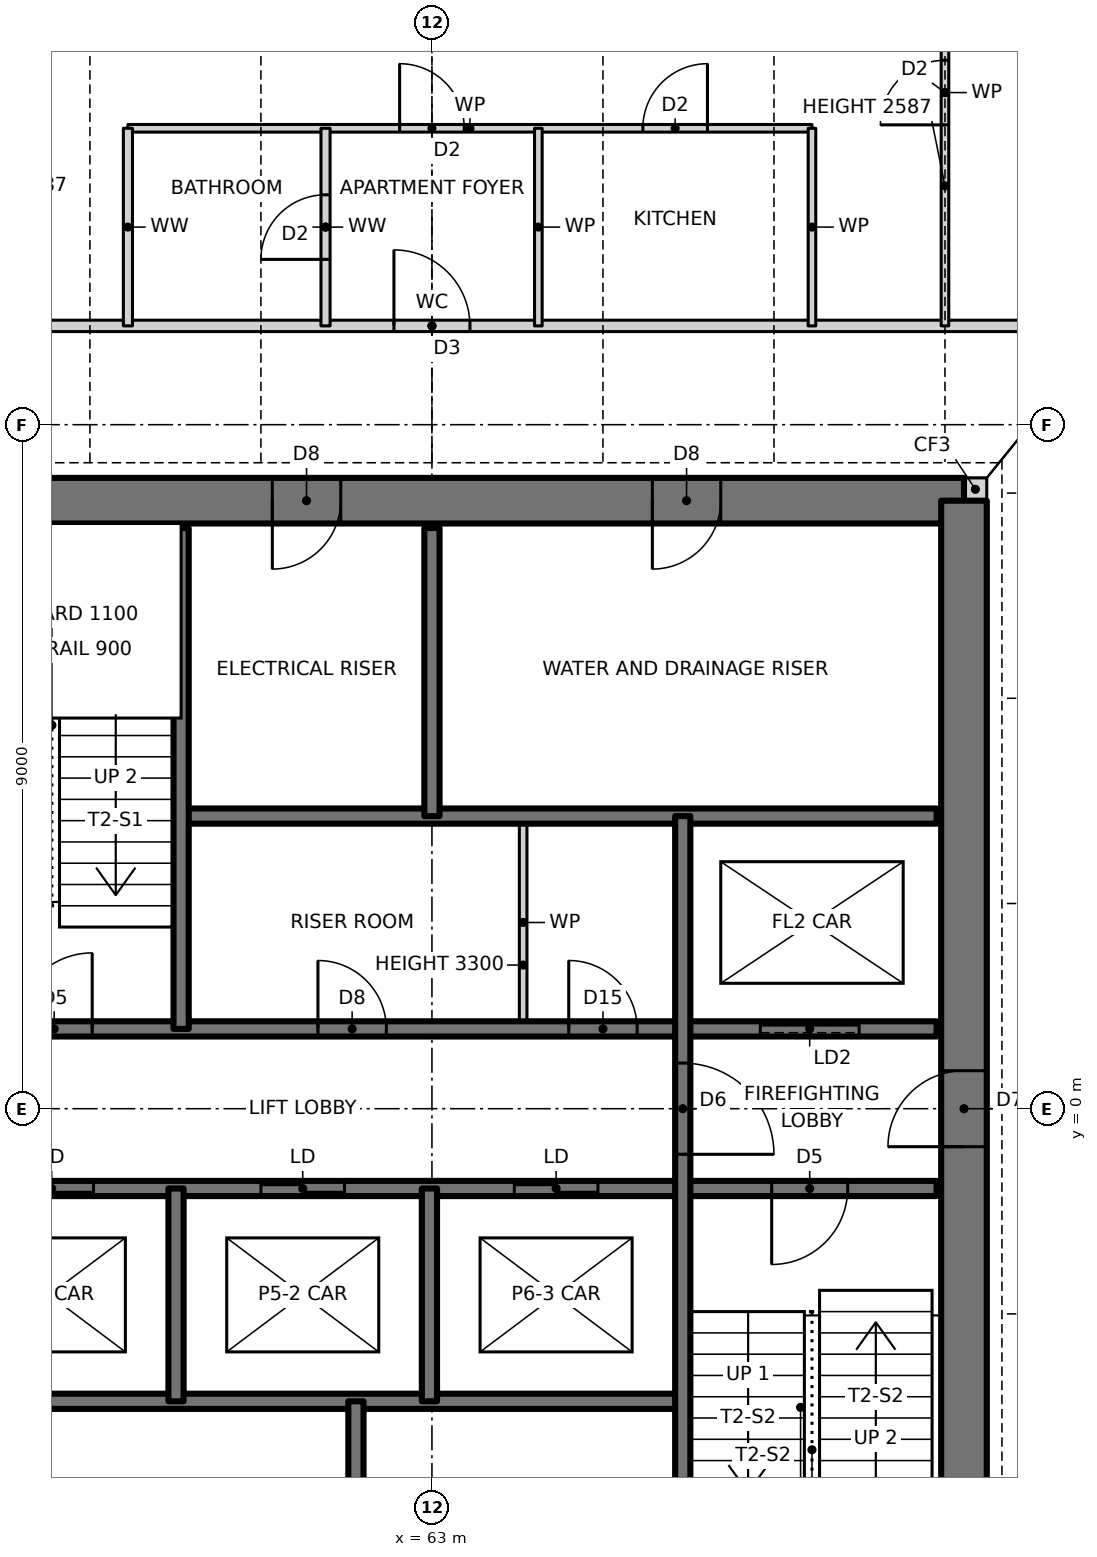
"""IFC4 building model, lengths in metres.
Left out: names, types, materials, properties, quantities, classifications, styles, units other than length and angle.
Written with IfcOpenShell. Run it as: python <this file> out.ifc"""

import sys

from ifc_helpers import new_model, si_unit, direction, frame, frame_2d, origin, place, context, subcontext, project, spatial, rectangle, extrude, element, fill, save


model = new_model("IFC4")
c1 = context("Model", 3, precision=1e-05, world=origin(), true_north=direction((0.0, 1.0)))
c2 = subcontext(c1, "Body", "Model", "MODEL_VIEW")
j1 = project(units=[si_unit("LENGTHUNIT", "METRE"), si_unit("PLANEANGLEUNIT", "RADIAN")], contexts=[c1])
p1 = place(None, origin())
s1 = spatial("IfcSite", under=j1, at=p1, CompositionType="ELEMENT")
p2 = place(p1, origin())
s2 = spatial("IfcBuilding", under=s1, at=p2, CompositionType="ELEMENT")
p3 = place(p2, frame((0.0, 0.0, 122.5)))
s3 = spatial("IfcBuildingStorey", under=s2, at=p3, CompositionType="ELEMENT", Elevation=122.5)
p4 = place(p3, frame((70.0, 8.15, 0.0), z_axis=(0.0, 0.0, 1.0), x_axis=(1.0, 0.0, 0.0)))
e1 = element("IfcWall", 1, at=p4, inside=s3, PredefinedType="SOLIDWALL", context=c2, shape_type="SweptSolid", body=[
    extrude(rectangle(XDim=0.3, YDim=0.3, at=frame_2d((0.15, 0.0))), origin(), (0.0, 0.0, 1.0), 3.5),
])
p5 = place(p3, frame((70.0, 8.0, 0.0), z_axis=(0.0, 0.0, 1.0), x_axis=(-1.0, 0.0, 0.0)))
e2 = element("IfcWall", 2, at=p5, inside=s3, PredefinedType="SHEAR", context=c2, shape_type="SweptSolid", body=[
    extrude(rectangle(XDim=14.0, YDim=0.6, at=frame_2d((7.0, 0.0))), origin(), (0.0, 0.0, 1.0), 3.5),
])
p6 = place(p5, frame((8.2, 0.0, 0.0)))
e3 = element("IfcOpeningElement", 3, at=p6, cuts=e2, PredefinedType="OPENING", context=c2, shape_type="SweptSolid", body=[
    extrude(rectangle(XDim=0.9, YDim=2.1, at=frame_2d((0.45, 1.05))), frame((0.0, 0.31, 0.0), z_axis=(0.0, -1.0, 0.0), x_axis=(1.0, 0.0, 0.0)), (0.0, 0.0, 1.0), 0.62),
])
p7 = place(p5, frame((3.2, 0.0, 0.0)))
e4 = element("IfcOpeningElement", 4, at=p7, cuts=e2, PredefinedType="OPENING", context=c2, shape_type="SweptSolid", body=[
    extrude(rectangle(XDim=0.9, YDim=2.1, at=frame_2d((0.45, 1.05))), frame((0.0, 0.31, 0.0), z_axis=(0.0, -1.0, 0.0), x_axis=(1.0, 0.0, 0.0)), (0.0, 0.0, 1.0), 0.62),
])
p8 = place(p3, frame((70.0, -8.0, 0.0), z_axis=(0.0, 0.0, 1.0), x_axis=(0.0, 1.0, 0.0)))
e5 = element("IfcWall", 5, at=p8, inside=s3, PredefinedType="SHEAR", context=c2, shape_type="SweptSolid", body=[
    extrude(rectangle(XDim=16.0, YDim=0.6, at=frame_2d((8.0, 0.0))), origin(), (0.0, 0.0, 1.0), 3.5),
])
p9 = place(p8, frame((7.5, 0.0, 0.0)))
e6 = element("IfcOpeningElement", 6, at=p9, cuts=e5, PredefinedType="OPENING", context=c2, shape_type="SweptSolid", body=[
    extrude(rectangle(XDim=1.0, YDim=2.1, at=frame_2d((0.5, 1.05))), frame((0.0, 0.31, 0.0), z_axis=(0.0, -1.0, 0.0), x_axis=(1.0, 0.0, 0.0)), (0.0, 0.0, 1.0), 0.62),
])
p10 = place(p3, frame((56.36, -3.85, 0.0), z_axis=(0.0, 0.0, 1.0), x_axis=(1.0, 0.0, 0.0)))
e7 = element("IfcWall", 7, at=p10, inside=s3, PredefinedType="SOLIDWALL", context=c2, shape_type="SweptSolid", body=[
    extrude(rectangle(XDim=9.94, YDim=0.2, at=frame_2d((4.97, 0.0))), origin(), (0.0, 0.0, 1.0), 3.5),
])
p11 = place(p3, frame((56.36, -1.05, 0.0), z_axis=(0.0, 0.0, 1.0), x_axis=(1.0, 0.0, 0.0)))
e8 = element("IfcWall", 8, at=p11, inside=s3, PredefinedType="SOLIDWALL", context=c2, shape_type="SweptSolid", body=[
    extrude(rectangle(XDim=13.28, YDim=0.2, at=frame_2d((6.64, 0.0))), origin(), (0.0, 0.0, 1.0), 3.5),
])
p12 = place(p11, frame((11.11, 0.0, 0.0)))
e9 = element("IfcOpeningElement", 9, at=p12, cuts=e8, PredefinedType="OPENING", context=c2, shape_type="SweptSolid", body=[
    extrude(rectangle(XDim=1.0, YDim=2.1, at=frame_2d((0.5, 1.05))), frame((0.0, 0.11, 0.0), z_axis=(0.0, -1.0, 0.0), x_axis=(1.0, 0.0, 0.0)), (0.0, 0.0, 1.0), 0.22),
])
p13 = place(p11, frame((1.087, 0.0, 0.0)))
e10 = element("IfcOpeningElement", 10, at=p13, cuts=e8, PredefinedType="OPENING", context=c2, shape_type="SweptSolid", body=[
    extrude(rectangle(XDim=1.1, YDim=2.1, at=frame_2d((0.55, 1.05))), frame((0.0, 0.11, 0.0), z_axis=(0.0, -1.0, 0.0), x_axis=(1.0, 0.0, 0.0)), (0.0, 0.0, 1.0), 0.22),
])
p14 = place(p11, frame((4.39, 0.0, 0.0)))
e11 = element("IfcOpeningElement", 11, at=p14, cuts=e8, PredefinedType="OPENING", context=c2, shape_type="SweptSolid", body=[
    extrude(rectangle(XDim=1.1, YDim=2.1, at=frame_2d((0.55, 1.05))), frame((0.0, 0.11, 0.0), z_axis=(0.0, -1.0, 0.0), x_axis=(1.0, 0.0, 0.0)), (0.0, 0.0, 1.0), 0.22),
])
p15 = place(p11, frame((7.724, 0.0, 0.0)))
e12 = element("IfcOpeningElement", 12, at=p15, cuts=e8, PredefinedType="OPENING", context=c2, shape_type="SweptSolid", body=[
    extrude(rectangle(XDim=1.1, YDim=2.1, at=frame_2d((0.55, 1.05))), frame((0.0, 0.11, 0.0), z_axis=(0.0, -1.0, 0.0), x_axis=(1.0, 0.0, 0.0)), (0.0, 0.0, 1.0), 0.22),
])
p16 = place(p3, frame((56.36, 1.05, 0.0), z_axis=(0.0, 0.0, 1.0), x_axis=(1.0, 0.0, 0.0)))
e13 = element("IfcWall", 13, at=p16, inside=s3, PredefinedType="SOLIDWALL", context=c2, shape_type="SweptSolid", body=[
    extrude(rectangle(XDim=13.28, YDim=0.2, at=frame_2d((6.64, 0.0))), origin(), (0.0, 0.0, 1.0), 3.5),
])
p17 = place(p16, frame((1.17, 0.0, 0.0)))
e14 = element("IfcOpeningElement", 14, at=p17, cuts=e13, PredefinedType="OPENING", context=c2, shape_type="SweptSolid", body=[
    extrude(rectangle(XDim=1.0, YDim=2.1, at=frame_2d((0.5, 1.05))), frame((0.0, 0.11, 0.0), z_axis=(0.0, -1.0, 0.0), x_axis=(1.0, 0.0, 0.0)), (0.0, 0.0, 1.0), 0.22),
])
p18 = place(p16, frame((5.14, 0.0, 0.0)))
e15 = element("IfcOpeningElement", 15, at=p18, cuts=e13, PredefinedType="OPENING", context=c2, shape_type="SweptSolid", body=[
    extrude(rectangle(XDim=0.9, YDim=2.1, at=frame_2d((0.45, 1.05))), frame((0.0, 0.11, 0.0), z_axis=(0.0, -1.0, 0.0), x_axis=(1.0, 0.0, 0.0)), (0.0, 0.0, 1.0), 0.22),
])
p19 = place(p16, frame((8.44, 0.0, 0.0)))
e16 = element("IfcOpeningElement", 16, at=p19, cuts=e13, PredefinedType="OPENING", context=c2, shape_type="SweptSolid", body=[
    extrude(rectangle(XDim=0.9, YDim=2.1, at=frame_2d((0.45, 1.05))), frame((0.0, 0.11, 0.0), z_axis=(0.0, -1.0, 0.0), x_axis=(1.0, 0.0, 0.0)), (0.0, 0.0, 1.0), 0.22),
])
p20 = place(p16, frame((10.96, 0.0, 0.0)))
e17 = element("IfcOpeningElement", 17, at=p20, cuts=e13, PredefinedType="OPENING", context=c2, shape_type="SweptSolid", body=[
    extrude(rectangle(XDim=1.3, YDim=2.1, at=frame_2d((0.65, 1.05))), frame((0.0, 0.11, 0.0), z_axis=(0.0, -1.0, 0.0), x_axis=(1.0, 0.0, 0.0)), (0.0, 0.0, 1.0), 0.22),
])
p21 = place(p3, frame((59.7, 3.85, 0.0), z_axis=(0.0, 0.0, 1.0), x_axis=(1.0, 0.0, 0.0)))
e18 = element("IfcWall", 18, at=p21, inside=s3, PredefinedType="SOLIDWALL", context=c2, shape_type="SweptSolid", body=[
    extrude(rectangle(XDim=9.94, YDim=0.2, at=frame_2d((4.97, 0.0))), origin(), (0.0, 0.0, 1.0), 3.5),
])
p22 = place(p3, frame((53.7, 10.3, 0.0), z_axis=(0.0, 0.0, 1.0), x_axis=(1.0, 0.0, 0.0)))
e19 = element("IfcWall", 19, at=p22, inside=s3, PredefinedType="PARTITIONING", context=c2, shape_type="SweptSolid", body=[
    extrude(rectangle(XDim=18.6, YDim=0.15, at=frame_2d((9.3, 0.0))), origin(), (0.0, 0.0, 1.0), 3.27),
])
p23 = place(p22, frame((8.8, 0.0, 0.0)))
e20 = element("IfcOpeningElement", 20, at=p23, cuts=e19, PredefinedType="OPENING", context=c2, shape_type="SweptSolid", body=[
    extrude(rectangle(XDim=1.0, YDim=2.1, at=frame_2d((0.5, 1.05))), frame((0.0, 0.085, 0.0), z_axis=(0.0, -1.0, 0.0), x_axis=(1.0, 0.0, 0.0)), (0.0, 0.0, 1.0), 0.17),
])
p24 = place(p3, frame((59.0, 12.9, 0.0), z_axis=(0.0, 0.0, 1.0), x_axis=(1.0, 0.0, 0.0)))
e21 = element("IfcWall", 21, at=p24, inside=s3, PredefinedType="PARTITIONING", context=c2, shape_type="SweptSolid", body=[
    extrude(rectangle(XDim=9.0, YDim=0.1, at=frame_2d((4.5, 0.0))), origin(), (0.0, 0.0, 1.0), 3.27),
])
p25 = place(p24, frame((6.775, 0.0, 0.0)))
e22 = element("IfcOpeningElement", 22, at=p25, cuts=e21, PredefinedType="OPENING", context=c2, shape_type="SweptSolid", body=[
    extrude(rectangle(XDim=0.85, YDim=2.1, at=frame_2d((0.425, 1.05))), frame((0.0, 0.06, 0.0), z_axis=(0.0, -1.0, 0.0), x_axis=(1.0, 0.0, 0.0)), (0.0, 0.0, 1.0), 0.12),
])
p26 = place(p24, frame((3.575, 0.0, 0.0)))
e23 = element("IfcOpeningElement", 23, at=p26, cuts=e21, PredefinedType="OPENING", context=c2, shape_type="SweptSolid", body=[
    extrude(rectangle(XDim=0.85, YDim=2.1, at=frame_2d((0.425, 1.05))), frame((0.0, 0.06, 0.0), z_axis=(0.0, -1.0, 0.0), x_axis=(1.0, 0.0, 0.0)), (0.0, 0.0, 1.0), 0.12),
])
p27 = place(p3, frame((69.75, 10.3, 0.0), z_axis=(0.0, 0.0, 1.0), x_axis=(0.0, 1.0, 0.0)))
e24 = element("IfcWall", 24, at=p27, inside=s3, PredefinedType="PARTITIONING", context=c2, shape_type="SweptSolid", body=[
    extrude(rectangle(XDim=6.14, YDim=0.1, at=frame_2d((3.07, 0.0))), origin(), (0.0, 0.0, 1.0), 2.587),
])
p28 = place(p27, frame((2.645, 0.0, 0.0)))
e25 = element("IfcOpeningElement", 25, at=p28, cuts=e24, PredefinedType="OPENING", context=c2, shape_type="SweptSolid", body=[
    extrude(rectangle(XDim=0.85, YDim=2.1, at=frame_2d((0.425, 1.05))), frame((0.0, 0.06, 0.0), z_axis=(0.0, -1.0, 0.0), x_axis=(1.0, 0.0, 0.0)), (0.0, 0.0, 1.0), 0.12),
])
p29 = place(p3, frame((68.0, 10.3, 0.0), z_axis=(0.0, 0.0, 1.0), x_axis=(0.0, 1.0, 0.0)))
e26 = element("IfcWall", 26, at=p29, inside=s3, PredefinedType="PARTITIONING", context=c2, shape_type="SweptSolid", body=[
    extrude(rectangle(XDim=2.6, YDim=0.1, at=frame_2d((1.3, 0.0))), origin(), (0.0, 0.0, 1.0), 3.27),
])
p30 = place(p3, frame((66.3, -7.64, 0.0), z_axis=(0.0, 0.0, 1.0), x_axis=(0.0, 1.0, 0.0)))
e27 = element("IfcWall", 27, at=p30, inside=s3, PredefinedType="SOLIDWALL", context=c2, shape_type="SweptSolid", body=[
    extrude(rectangle(XDim=11.49, YDim=0.2, at=frame_2d((5.745, 0.0))), origin(), (0.0, 0.0, 1.0), 3.5),
])
p31 = place(p30, frame((7.04, 0.0, 0.0)))
e28 = element("IfcOpeningElement", 28, at=p31, cuts=e27, PredefinedType="OPENING", context=c2, shape_type="SweptSolid", body=[
    extrude(rectangle(XDim=1.2, YDim=2.1, at=frame_2d((0.6, 1.05))), frame((0.0, 0.11, 0.0), z_axis=(0.0, -1.0, 0.0), x_axis=(1.0, 0.0, 0.0)), (0.0, 0.0, 1.0), 0.22),
])
p32 = place(p3, frame((64.4, 10.3, 0.0), z_axis=(0.0, 0.0, 1.0), x_axis=(0.0, 1.0, 0.0)))
e29 = element("IfcWall", 29, at=p32, inside=s3, PredefinedType="PARTITIONING", context=c2, shape_type="SweptSolid", body=[
    extrude(rectangle(XDim=2.6, YDim=0.1, at=frame_2d((1.3, 0.0))), origin(), (0.0, 0.0, 1.0), 3.27),
])
p33 = place(p3, frame((64.2, 1.05, 0.0), z_axis=(0.0, 0.0, 1.0), x_axis=(0.0, 1.0, 0.0)))
e30 = element("IfcWall", 30, at=p33, inside=s3, PredefinedType="PARTITIONING", context=c2, shape_type="SweptSolid", body=[
    extrude(rectangle(XDim=2.8, YDim=0.1, at=frame_2d((1.4, 0.0))), origin(), (0.0, 0.0, 1.0), 3.3),
])
p34 = place(p3, frame((63.0, 3.85, 0.0), z_axis=(0.0, 0.0, 1.0), x_axis=(0.0, 1.0, 0.0)))
e31 = element("IfcWall", 31, at=p34, inside=s3, PredefinedType="SOLIDWALL", context=c2, shape_type="SweptSolid", body=[
    extrude(rectangle(XDim=3.79, YDim=0.2, at=frame_2d((1.895, 0.0))), origin(), (0.0, 0.0, 1.0), 3.5),
])
p35 = place(p3, frame((62.967, -3.85, 0.0), z_axis=(0.0, 0.0, 1.0), x_axis=(0.0, 1.0, 0.0)))
e32 = element("IfcWall", 32, at=p35, inside=s3, PredefinedType="SOLIDWALL", context=c2, shape_type="SweptSolid", body=[
    extrude(rectangle(XDim=2.8, YDim=0.2, at=frame_2d((1.4, 0.0))), origin(), (0.0, 0.0, 1.0), 3.5),
])
p36 = place(p3, frame((62.0, -7.64, 0.0), z_axis=(0.0, 0.0, 1.0), x_axis=(0.0, 1.0, 0.0)))
e33 = element("IfcWall", 33, at=p36, inside=s3, PredefinedType="SOLIDWALL", context=c2, shape_type="SweptSolid", body=[
    extrude(rectangle(XDim=3.79, YDim=0.2, at=frame_2d((1.895, 0.0))), origin(), (0.0, 0.0, 1.0), 3.5),
])
p37 = place(p3, frame((61.6, 10.3, 0.0), z_axis=(0.0, 0.0, 1.0), x_axis=(0.0, 1.0, 0.0)))
e34 = element("IfcWall", 34, at=p37, inside=s3, PredefinedType="PARTITIONING", context=c2, shape_type="SweptSolid", body=[
    extrude(rectangle(XDim=2.6, YDim=0.12, at=frame_2d((1.3, 0.0))), origin(), (0.0, 0.0, 1.0), 3.27),
])
p38 = place(p37, frame((0.875, 0.0, 0.0)))
e35 = element("IfcOpeningElement", 35, at=p38, cuts=e34, PredefinedType="OPENING", context=c2, shape_type="SweptSolid", body=[
    extrude(rectangle(XDim=0.85, YDim=2.1, at=frame_2d((0.425, 1.05))), frame((0.0, 0.07, 0.0), z_axis=(0.0, -1.0, 0.0), x_axis=(1.0, 0.0, 0.0)), (0.0, 0.0, 1.0), 0.14),
])
p39 = place(p3, frame((59.7, 1.05, 0.0), z_axis=(0.0, 0.0, 1.0), x_axis=(0.0, 1.0, 0.0)))
e36 = element("IfcWall", 36, at=p39, inside=s3, PredefinedType="SOLIDWALL", context=c2, shape_type="SweptSolid", body=[
    extrude(rectangle(XDim=6.59, YDim=0.2, at=frame_2d((3.295, 0.0))), origin(), (0.0, 0.0, 1.0), 3.5),
])
p40 = place(p3, frame((59.633, -3.85, 0.0), z_axis=(0.0, 0.0, 1.0), x_axis=(0.0, 1.0, 0.0)))
e37 = element("IfcWall", 37, at=p40, inside=s3, PredefinedType="SOLIDWALL", context=c2, shape_type="SweptSolid", body=[
    extrude(rectangle(XDim=2.8, YDim=0.2, at=frame_2d((1.4, 0.0))), origin(), (0.0, 0.0, 1.0), 3.5),
])
p41 = place(p3, frame((59.0, 10.3, 0.0), z_axis=(0.0, 0.0, 1.0), x_axis=(0.0, 1.0, 0.0)))
e38 = element("IfcWall", 38, at=p41, inside=s3, PredefinedType="PARTITIONING", context=c2, shape_type="SweptSolid", body=[
    extrude(rectangle(XDim=2.6, YDim=0.12, at=frame_2d((1.3, 0.0))), origin(), (0.0, 0.0, 1.0), 3.27),
])
p42 = place(p17, origin())
e39 = element("IfcDoor", 39, at=p42, inside=s3, OperationType="SINGLE_SWING_RIGHT", PredefinedType="DOOR", context=c2, shape_type="SweptSolid", body=[
    extrude(rectangle(XDim=1.0, YDim=2.1, at=frame_2d((0.5, 1.05))), frame((0.0, 0.025, 0.0), z_axis=(0.0, -1.0, 0.0), x_axis=(1.0, 0.0, 0.0)), (0.0, 0.0, 1.0), 0.05),
])
fill(e14, e39)
p43 = place(p12, frame((1.0, 0.0, 0.0), z_axis=(0.0, 0.0, 1.0), x_axis=(-1.0, 0.0, 0.0)))
e40 = element("IfcDoor", 40, at=p43, inside=s3, OperationType="SINGLE_SWING_RIGHT", PredefinedType="DOOR", context=c2, shape_type="SweptSolid", body=[
    extrude(rectangle(XDim=1.0, YDim=2.1, at=frame_2d((0.5, 1.05))), frame((0.0, 0.025, 0.0), z_axis=(0.0, -1.0, 0.0), x_axis=(1.0, 0.0, 0.0)), (0.0, 0.0, 1.0), 0.05),
])
fill(e9, e40)
p44 = place(p31, frame((1.2, 0.0, 0.0), z_axis=(0.0, 0.0, 1.0), x_axis=(-1.0, 0.0, 0.0)))
e41 = element("IfcDoor", 41, at=p44, inside=s3, OperationType="SINGLE_SWING_RIGHT", PredefinedType="DOOR", context=c2, shape_type="SweptSolid", body=[
    extrude(rectangle(XDim=1.2, YDim=2.1, at=frame_2d((0.6, 1.05))), frame((0.0, 0.025, 0.0), z_axis=(0.0, -1.0, 0.0), x_axis=(1.0, 0.0, 0.0)), (0.0, 0.0, 1.0), 0.05),
])
fill(e28, e41)
p45 = place(p18, origin())
e42 = element("IfcDoor", 42, at=p45, inside=s3, OperationType="SINGLE_SWING_LEFT", PredefinedType="DOOR", context=c2, shape_type="SweptSolid", body=[
    extrude(rectangle(XDim=0.9, YDim=2.1, at=frame_2d((0.45, 1.05))), frame((0.0, 0.025, 0.0), z_axis=(0.0, -1.0, 0.0), x_axis=(1.0, 0.0, 0.0)), (0.0, 0.0, 1.0), 0.05),
])
fill(e15, e42)
p46 = place(p19, origin())
e43 = element("IfcDoor", 43, at=p46, inside=s3, OperationType="SINGLE_SWING_LEFT", PredefinedType="DOOR", context=c2, shape_type="SweptSolid", body=[
    extrude(rectangle(XDim=0.9, YDim=2.1, at=frame_2d((0.45, 1.05))), frame((0.0, 0.025, 0.0), z_axis=(0.0, -1.0, 0.0), x_axis=(1.0, 0.0, 0.0)), (0.0, 0.0, 1.0), 0.05),
])
fill(e16, e43)
p47 = place(p25, origin())
e44 = element("IfcDoor", 44, at=p47, inside=s3, OperationType="SINGLE_SWING_RIGHT", PredefinedType="DOOR", context=c2, shape_type="SweptSolid", body=[
    extrude(rectangle(XDim=0.85, YDim=2.1, at=frame_2d((0.425, 1.05))), frame((0.0, 0.025, 0.0), z_axis=(0.0, -1.0, 0.0), x_axis=(1.0, 0.0, 0.0)), (0.0, 0.0, 1.0), 0.05),
])
fill(e22, e44)
p48 = place(p23, origin())
e45 = element("IfcDoor", 45, at=p48, inside=s3, OperationType="SINGLE_SWING_LEFT", PredefinedType="DOOR", context=c2, shape_type="SweptSolid", body=[
    extrude(rectangle(XDim=1.0, YDim=2.1, at=frame_2d((0.5, 1.05))), frame((0.0, 0.025, 0.0), z_axis=(0.0, -1.0, 0.0), x_axis=(1.0, 0.0, 0.0)), (0.0, 0.0, 1.0), 0.05),
])
fill(e20, e45)
p49 = place(p26, origin())
e46 = element("IfcDoor", 46, at=p49, inside=s3, OperationType="SINGLE_SWING_LEFT", PredefinedType="DOOR", context=c2, shape_type="SweptSolid", body=[
    extrude(rectangle(XDim=0.85, YDim=2.1, at=frame_2d((0.425, 1.05))), frame((0.0, 0.025, 0.0), z_axis=(0.0, -1.0, 0.0), x_axis=(1.0, 0.0, 0.0)), (0.0, 0.0, 1.0), 0.05),
])
fill(e23, e46)
p50 = place(p38, origin())
e47 = element("IfcDoor", 47, at=p50, inside=s3, OperationType="SINGLE_SWING_LEFT", PredefinedType="DOOR", context=c2, shape_type="SweptSolid", body=[
    extrude(rectangle(XDim=0.85, YDim=2.1, at=frame_2d((0.425, 1.05))), frame((0.0, 0.025, 0.0), z_axis=(0.0, -1.0, 0.0), x_axis=(1.0, 0.0, 0.0)), (0.0, 0.0, 1.0), 0.05),
])
fill(e35, e47)
p51 = place(p28, origin())
e48 = element("IfcDoor", 48, at=p51, inside=s3, OperationType="SINGLE_SWING_LEFT", PredefinedType="DOOR", context=c2, shape_type="SweptSolid", body=[
    extrude(rectangle(XDim=0.85, YDim=2.1, at=frame_2d((0.425, 1.05))), frame((0.0, 0.025, 0.0), z_axis=(0.0, -1.0, 0.0), x_axis=(1.0, 0.0, 0.0)), (0.0, 0.0, 1.0), 0.05),
])
fill(e25, e48)
p52 = place(p9, origin())
e49 = element("IfcDoor", 49, at=p52, inside=s3, OperationType="SINGLE_SWING_LEFT", PredefinedType="DOOR", context=c2, shape_type="SweptSolid", body=[
    extrude(rectangle(XDim=1.0, YDim=2.1, at=frame_2d((0.5, 1.05))), frame((0.0, 0.025, 0.0), z_axis=(0.0, -1.0, 0.0), x_axis=(1.0, 0.0, 0.0)), (0.0, 0.0, 1.0), 0.05),
])
fill(e6, e49)
p53 = place(p6, origin())
e50 = element("IfcDoor", 50, at=p53, inside=s3, OperationType="SINGLE_SWING_RIGHT", PredefinedType="DOOR", context=c2, shape_type="SweptSolid", body=[
    extrude(rectangle(XDim=0.9, YDim=2.1, at=frame_2d((0.45, 1.05))), frame((0.0, 0.025, 0.0), z_axis=(0.0, -1.0, 0.0), x_axis=(1.0, 0.0, 0.0)), (0.0, 0.0, 1.0), 0.05),
])
fill(e3, e50)
p54 = place(p7, origin())
e51 = element("IfcDoor", 51, at=p54, inside=s3, OperationType="SINGLE_SWING_RIGHT", PredefinedType="DOOR", context=c2, shape_type="SweptSolid", body=[
    extrude(rectangle(XDim=0.9, YDim=2.1, at=frame_2d((0.45, 1.05))), frame((0.0, 0.025, 0.0), z_axis=(0.0, -1.0, 0.0), x_axis=(1.0, 0.0, 0.0)), (0.0, 0.0, 1.0), 0.05),
])
fill(e4, e51)
p55 = place(p13, origin())
e52 = element("IfcDoor", 52, at=p55, inside=s3, OperationType="DOUBLE_DOOR_SLIDING", PredefinedType="DOOR", context=c2, shape_type="SweptSolid", body=[
    extrude(rectangle(XDim=1.1, YDim=2.1, at=frame_2d((0.55, 1.05))), frame((0.0, 0.025, 0.0), z_axis=(0.0, -1.0, 0.0), x_axis=(1.0, 0.0, 0.0)), (0.0, 0.0, 1.0), 0.05),
])
fill(e10, e52)
p56 = place(p14, origin())
e53 = element("IfcDoor", 53, at=p56, inside=s3, OperationType="DOUBLE_DOOR_SLIDING", PredefinedType="DOOR", context=c2, shape_type="SweptSolid", body=[
    extrude(rectangle(XDim=1.1, YDim=2.1, at=frame_2d((0.55, 1.05))), frame((0.0, 0.025, 0.0), z_axis=(0.0, -1.0, 0.0), x_axis=(1.0, 0.0, 0.0)), (0.0, 0.0, 1.0), 0.05),
])
fill(e11, e53)
p57 = place(p15, origin())
e54 = element("IfcDoor", 54, at=p57, inside=s3, OperationType="DOUBLE_DOOR_SLIDING", PredefinedType="DOOR", context=c2, shape_type="SweptSolid", body=[
    extrude(rectangle(XDim=1.1, YDim=2.1, at=frame_2d((0.55, 1.05))), frame((0.0, 0.025, 0.0), z_axis=(0.0, -1.0, 0.0), x_axis=(1.0, 0.0, 0.0)), (0.0, 0.0, 1.0), 0.05),
])
fill(e12, e54)
p58 = place(p20, origin())
e55 = element("IfcDoor", 55, at=p58, inside=s3, OperationType="SLIDING_TO_LEFT", PredefinedType="DOOR", context=c2, shape_type="SweptSolid", body=[
    extrude(rectangle(XDim=1.3, YDim=2.1, at=frame_2d((0.65, 1.05))), frame((0.0, 0.025, 0.0), z_axis=(0.0, -1.0, 0.0), x_axis=(1.0, 0.0, 0.0)), (0.0, 0.0, 1.0), 0.05),
])
fill(e17, e55)
save(model, sys.argv[1])
